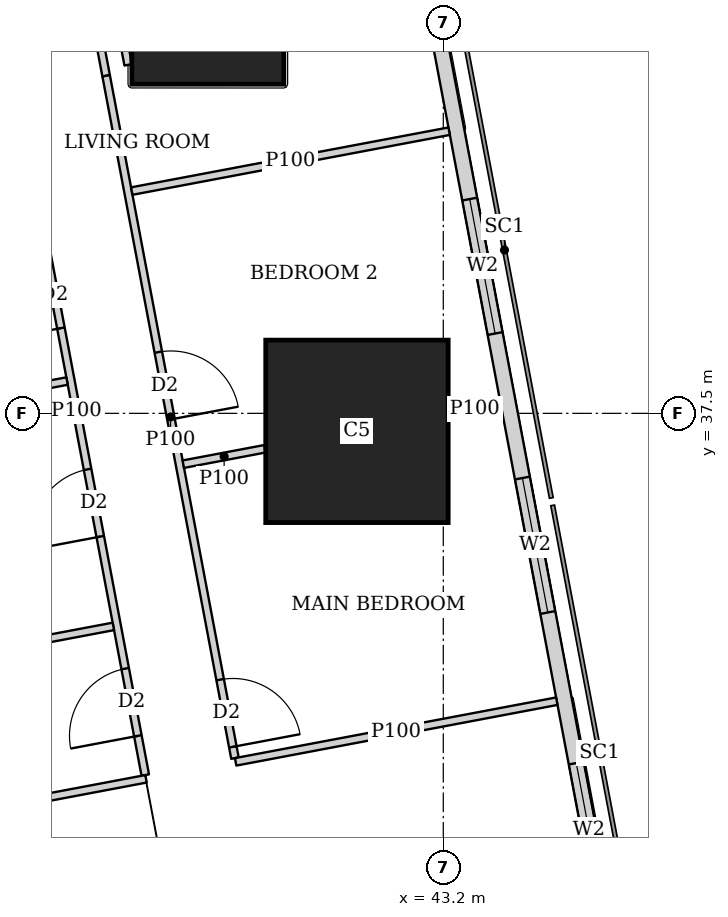
"""IFC4 building model, lengths in metres.
Left out: names, types, materials, properties, quantities, classifications, styles, units other than length and angle.
Written with IfcOpenShell. Run it as: python <this file> out.ifc"""

import sys

from ifc_helpers import new_model, si_unit, direction, frame, frame_2d, origin, origin_2d, place, context, subcontext, project, spatial, rectangle, extrude, element, fill, save


model = new_model("IFC4")
c1 = context("Model", 3, precision=1e-05, world=origin(), true_north=direction((0.0, 1.0)))
c2 = subcontext(c1, "Body", "Model", "MODEL_VIEW")
j1 = project(units=[si_unit("LENGTHUNIT", "METRE"), si_unit("PLANEANGLEUNIT", "RADIAN")], contexts=[c1])
p1 = place(None, origin())
s1 = spatial("IfcSite", under=j1, at=p1, CompositionType="ELEMENT")
p2 = place(p1, origin())
s2 = spatial("IfcBuilding", under=s1, at=p2, CompositionType="ELEMENT")
p3 = place(p2, frame((0.0, 0.0, 212.45)))
s3 = spatial("IfcBuildingStorey", under=s2, at=p3, CompositionType="ELEMENT", Elevation=212.45)
p4 = place(p3, frame((42.064, 37.263, 0.0), z_axis=(0.0, 0.0, 1.0), x_axis=(1.0, 0.0, 0.0)))
e1 = element("IfcColumn", 1, at=p4, inside=s3, PredefinedType="COLUMN", context=c2, shape_type="SweptSolid", body=[
    extrude(rectangle(XDim=2.4, YDim=2.4, at=origin_2d()), origin(), (0.0, 0.0, 1.0), 3.75),
])
p5 = place(p3, frame((40.102, 42.83, 0.0), z_axis=(0.0, 0.0, 1.0), x_axis=(1.0, 0.0, 0.0)))
e2 = element("IfcColumn", 2, at=p5, inside=s3, PredefinedType="COLUMN", context=c2, shape_type="SweptSolid", body=[
    extrude(rectangle(XDim=2.0, YDim=2.0, at=origin_2d()), origin(), (0.0, 0.0, 1.0), 3.75),
])
p6 = place(p3, frame((50.653, 2.703, 0.0), z_axis=(0.0, 0.0, 1.0), x_axis=(-0.185612026696, 0.982623109613, 0.0)))
e3 = element("IfcWall", 3, at=p6, inside=s3, PredefinedType="SOLIDWALL", context=c2, shape_type="SweptSolid", body=[
    extrude(rectangle(XDim=41.393, YDim=0.2, at=frame_2d((20.697, 0.0))), origin(), (0.0, 0.0, 1.0), 3.5),
])
p7 = place(p6, frame((1.633, 0.0, 0.9)))
e4 = element("IfcOpeningElement", 4, at=p7, cuts=e3, PredefinedType="OPENING", context=c2, shape_type="SweptSolid", body=[
    extrude(rectangle(XDim=1.8, YDim=1.5, at=frame_2d((0.9, 0.75))), frame((0.0, 0.11, 0.0), z_axis=(0.0, -1.0, 0.0), x_axis=(1.0, 0.0, 0.0)), (0.0, 0.0, 1.0), 0.22),
])
p8 = place(p6, frame((6.032, 0.0, 0.9)))
e5 = element("IfcOpeningElement", 5, at=p8, cuts=e3, PredefinedType="OPENING", context=c2, shape_type="SweptSolid", body=[
    extrude(rectangle(XDim=1.8, YDim=1.5, at=frame_2d((0.9, 0.75))), frame((0.0, 0.11, 0.0), z_axis=(0.0, -1.0, 0.0), x_axis=(1.0, 0.0, 0.0)), (0.0, 0.0, 1.0), 0.22),
])
p9 = place(p6, frame((9.848, 0.0, 0.9)))
e6 = element("IfcOpeningElement", 6, at=p9, cuts=e3, PredefinedType="OPENING", context=c2, shape_type="SweptSolid", body=[
    extrude(rectangle(XDim=1.8, YDim=1.5, at=frame_2d((0.9, 0.75))), frame((0.0, 0.11, 0.0), z_axis=(0.0, -1.0, 0.0), x_axis=(1.0, 0.0, 0.0)), (0.0, 0.0, 1.0), 0.22),
])
p10 = place(p6, frame((13.664, 0.0, 0.9)))
e7 = element("IfcOpeningElement", 7, at=p10, cuts=e3, PredefinedType="OPENING", context=c2, shape_type="SweptSolid", body=[
    extrude(rectangle(XDim=1.8, YDim=1.5, at=frame_2d((0.9, 0.75))), frame((0.0, 0.11, 0.0), z_axis=(0.0, -1.0, 0.0), x_axis=(1.0, 0.0, 0.0)), (0.0, 0.0, 1.0), 0.22),
])
p11 = place(p6, frame((17.481, 0.0, 0.9)))
e8 = element("IfcOpeningElement", 8, at=p11, cuts=e3, PredefinedType="OPENING", context=c2, shape_type="SweptSolid", body=[
    extrude(rectangle(XDim=1.8, YDim=1.5, at=frame_2d((0.9, 0.75))), frame((0.0, 0.11, 0.0), z_axis=(0.0, -1.0, 0.0), x_axis=(1.0, 0.0, 0.0)), (0.0, 0.0, 1.0), 0.22),
])
p12 = place(p6, frame((21.297, 0.0, 0.9)))
e9 = element("IfcOpeningElement", 9, at=p12, cuts=e3, PredefinedType="OPENING", context=c2, shape_type="SweptSolid", body=[
    extrude(rectangle(XDim=1.8, YDim=1.5, at=frame_2d((0.9, 0.75))), frame((0.0, 0.11, 0.0), z_axis=(0.0, -1.0, 0.0), x_axis=(1.0, 0.0, 0.0)), (0.0, 0.0, 1.0), 0.22),
])
p13 = place(p6, frame((25.113, 0.0, 0.9)))
e10 = element("IfcOpeningElement", 10, at=p13, cuts=e3, PredefinedType="OPENING", context=c2, shape_type="SweptSolid", body=[
    extrude(rectangle(XDim=1.8, YDim=1.5, at=frame_2d((0.9, 0.75))), frame((0.0, 0.11, 0.0), z_axis=(0.0, -1.0, 0.0), x_axis=(1.0, 0.0, 0.0)), (0.0, 0.0, 1.0), 0.22),
])
p14 = place(p6, frame((28.93, 0.0, 0.9)))
e11 = element("IfcOpeningElement", 11, at=p14, cuts=e3, PredefinedType="OPENING", context=c2, shape_type="SweptSolid", body=[
    extrude(rectangle(XDim=1.8, YDim=1.5, at=frame_2d((0.9, 0.75))), frame((0.0, 0.11, 0.0), z_axis=(0.0, -1.0, 0.0), x_axis=(1.0, 0.0, 0.0)), (0.0, 0.0, 1.0), 0.22),
])
p15 = place(p6, frame((32.746, 0.0, 0.9)))
e12 = element("IfcOpeningElement", 12, at=p15, cuts=e3, PredefinedType="OPENING", context=c2, shape_type="SweptSolid", body=[
    extrude(rectangle(XDim=1.8, YDim=1.5, at=frame_2d((0.9, 0.75))), frame((0.0, 0.11, 0.0), z_axis=(0.0, -1.0, 0.0), x_axis=(1.0, 0.0, 0.0)), (0.0, 0.0, 1.0), 0.22),
])
p16 = place(p6, frame((36.481, 0.0, 0.9)))
e13 = element("IfcOpeningElement", 13, at=p16, cuts=e3, PredefinedType="OPENING", context=c2, shape_type="SweptSolid", body=[
    extrude(rectangle(XDim=1.8, YDim=1.5, at=frame_2d((0.9, 0.75))), frame((0.0, 0.11, 0.0), z_axis=(0.0, -1.0, 0.0), x_axis=(1.0, 0.0, 0.0)), (0.0, 0.0, 1.0), 0.22),
])
p17 = place(p3, frame((33.68, 42.723, 0.0), z_axis=(0.0, 0.0, 1.0), x_axis=(0.185601160014, -0.982625162207, 0.0)))
e14 = element("IfcWall", 14, at=p17, inside=s3, PredefinedType="SOLIDWALL", context=c2, shape_type="SweptSolid", body=[
    extrude(rectangle(XDim=41.051, YDim=0.15, at=frame_2d((20.526, 0.0))), origin(), (0.0, 0.0, 1.0), 2.5),
])
p18 = place(p17, frame((12.307, 0.0, 0.0)))
e15 = element("IfcOpeningElement", 15, at=p18, cuts=e14, PredefinedType="OPENING", context=c2, shape_type="SweptSolid", body=[
    extrude(rectangle(XDim=1.0, YDim=2.1, at=frame_2d((0.5, 1.05))), frame((0.0, 0.085, 0.0), z_axis=(0.0, -1.0, 0.0), x_axis=(1.0, 0.0, 0.0)), (0.0, 0.0, 1.0), 0.17),
])
p19 = place(p17, frame((16.123, 0.0, 0.0)))
e16 = element("IfcOpeningElement", 16, at=p19, cuts=e14, PredefinedType="OPENING", context=c2, shape_type="SweptSolid", body=[
    extrude(rectangle(XDim=1.0, YDim=2.1, at=frame_2d((0.5, 1.05))), frame((0.0, 0.085, 0.0), z_axis=(0.0, -1.0, 0.0), x_axis=(1.0, 0.0, 0.0)), (0.0, 0.0, 1.0), 0.17),
])
p20 = place(p17, frame((30.902, 0.0, 0.0)))
e17 = element("IfcOpeningElement", 17, at=p20, cuts=e14, PredefinedType="OPENING", context=c2, shape_type="SweptSolid", body=[
    extrude(rectangle(XDim=1.0, YDim=2.1, at=frame_2d((0.5, 1.05))), frame((0.0, 0.085, 0.0), z_axis=(0.0, -1.0, 0.0), x_axis=(1.0, 0.0, 0.0)), (0.0, 0.0, 1.0), 0.17),
])
p21 = place(p3, frame((39.054, 42.085, 0.0), z_axis=(0.0, 0.0, 1.0), x_axis=(-0.185791584218, 0.982589175207, 0.0)))
e18 = element("IfcWall", 18, at=p21, inside=s3, PredefinedType="PARTITIONING", context=c2, shape_type="SweptSolid", body=[
    extrude(rectangle(XDim=3.628, YDim=0.1, at=frame_2d((1.814, 0.0))), origin(), (0.0, 0.0, 1.0), 2.05),
])
p22 = place(p3, frame((38.256, 44.628, 0.0), z_axis=(0.0, 0.0, 1.0), x_axis=(0.185700639943, -0.982606366927, 0.0)))
e19 = element("IfcWall", 19, at=p22, inside=s3, PredefinedType="PARTITIONING", context=c2, shape_type="SweptSolid", body=[
    extrude(rectangle(XDim=2.735, YDim=0.1, at=frame_2d((1.367, 0.0))), origin(), (0.0, 0.0, 1.0), 2.05),
])
p23 = place(p3, frame((38.764, 41.941, 0.0), z_axis=(0.0, 0.0, 1.0), x_axis=(0.185548572312, -0.982635093671, 0.0)))
e20 = element("IfcWall", 20, at=p23, inside=s3, PredefinedType="PARTITIONING", context=c2, shape_type="SweptSolid", body=[
    extrude(rectangle(XDim=9.135, YDim=0.1, at=frame_2d((4.568, 0.0))), origin(), (0.0, 0.0, 1.0), 3.5),
])
p24 = place(p23, frame((8.085, 0.0, 0.0)))
e21 = element("IfcOpeningElement", 21, at=p24, cuts=e20, PredefinedType="OPENING", context=c2, shape_type="SweptSolid", body=[
    extrude(rectangle(XDim=0.9, YDim=2.1, at=frame_2d((0.45, 1.05))), frame((0.0, 0.06, 0.0), z_axis=(0.0, -1.0, 0.0), x_axis=(1.0, 0.0, 0.0)), (0.0, 0.0, 1.0), 0.12),
])
p25 = place(p23, frame((3.7, 0.0, 0.0)))
e22 = element("IfcOpeningElement", 22, at=p25, cuts=e20, PredefinedType="OPENING", context=c2, shape_type="SweptSolid", body=[
    extrude(rectangle(XDim=0.9, YDim=2.1, at=frame_2d((0.45, 1.05))), frame((0.0, 0.06, 0.0), z_axis=(0.0, -1.0, 0.0), x_axis=(1.0, 0.0, 0.0)), (0.0, 0.0, 1.0), 0.12),
])
p26 = place(p3, frame((37.473, 42.309, 0.0), z_axis=(0.0, 0.0, 1.0), x_axis=(0.185491912953, -0.982645790827, 0.0)))
e23 = element("IfcWall", 23, at=p26, inside=s3, PredefinedType="PARTITIONING", context=c2, shape_type="SweptSolid", body=[
    extrude(rectangle(XDim=9.737, YDim=0.1, at=frame_2d((4.869, 0.0))), origin(), (0.0, 0.0, 1.0), 3.5),
])
p27 = place(p26, frame((8.312, 0.0, 0.0)))
e24 = element("IfcOpeningElement", 24, at=p27, cuts=e23, PredefinedType="OPENING", context=c2, shape_type="SweptSolid", body=[
    extrude(rectangle(XDim=0.9, YDim=2.1, at=frame_2d((0.45, 1.05))), frame((0.0, 0.06, 0.0), z_axis=(0.0, -1.0, 0.0), x_axis=(1.0, 0.0, 0.0)), (0.0, 0.0, 1.0), 0.12),
])
p28 = place(p26, frame((2.853, 0.0, 0.0)))
e25 = element("IfcOpeningElement", 25, at=p28, cuts=e23, PredefinedType="OPENING", context=c2, shape_type="SweptSolid", body=[
    extrude(rectangle(XDim=0.9, YDim=2.1, at=frame_2d((0.45, 1.05))), frame((0.0, 0.06, 0.0), z_axis=(0.0, -1.0, 0.0), x_axis=(1.0, 0.0, 0.0)), (0.0, 0.0, 1.0), 0.12),
])
p29 = place(p26, frame((5.644, 0.0, 0.0)))
e26 = element("IfcOpeningElement", 26, at=p29, cuts=e23, PredefinedType="OPENING", context=c2, shape_type="SweptSolid", body=[
    extrude(rectangle(XDim=0.9, YDim=2.1, at=frame_2d((0.45, 1.05))), frame((0.0, 0.06, 0.0), z_axis=(0.0, -1.0, 0.0), x_axis=(1.0, 0.0, 0.0)), (0.0, 0.0, 1.0), 0.12),
])
p30 = place(p3, frame((43.277, 41.212, 0.0), z_axis=(0.0, 0.0, 1.0), x_axis=(-0.982665405803, -0.185387972203, 0.0)))
e27 = element("IfcWall", 27, at=p30, inside=s3, PredefinedType="PARTITIONING", context=c2, shape_type="SweptSolid", body=[
    extrude(rectangle(XDim=4.25, YDim=0.1, at=frame_2d((2.125, 0.0))), origin(), (0.0, 0.0, 1.0), 2.05),
])
p31 = place(p3, frame((43.955, 37.62, 0.0), z_axis=(0.0, 0.0, 1.0), x_axis=(-0.982495415327, -0.186286765128, 0.0)))
e28 = element("IfcWall", 28, at=p31, inside=s3, PredefinedType="PARTITIONING", context=c2, shape_type="SweptSolid", body=[
    extrude(rectangle(XDim=0.693, YDim=0.1, at=frame_2d((0.347, 0.0))), origin(), (0.0, 0.0, 1.0), 3.5),
])
p32 = place(p3, frame((40.854, 37.034, 0.0), z_axis=(0.0, 0.0, 1.0), x_axis=(-0.982651678759, -0.185460718839, 0.0)))
e29 = element("IfcWall", 29, at=p32, inside=s3, PredefinedType="PARTITIONING", context=c2, shape_type="SweptSolid", body=[
    extrude(rectangle(XDim=1.094, YDim=0.1, at=frame_2d((0.547, 0.0))), origin(), (0.0, 0.0, 1.0), 3.5),
])
p33 = place(p3, frame((44.693, 33.713, 0.0), z_axis=(0.0, 0.0, 1.0), x_axis=(-0.982633535512, -0.185556823879, 0.0)))
e30 = element("IfcWall", 30, at=p33, inside=s3, PredefinedType="PARTITIONING", context=c2, shape_type="SweptSolid", body=[
    extrude(rectangle(XDim=4.3, YDim=0.1, at=frame_2d((2.15, 0.0))), origin(), (0.0, 0.0, 1.0), 2.05),
])
p34 = place(p3, frame((38.25, 37.925, 0.0), z_axis=(0.0, 0.0, 1.0), x_axis=(-0.982610209589, -0.185680305934, 0.0)))
e31 = element("IfcWall", 31, at=p34, inside=s3, PredefinedType="PARTITIONING", context=c2, shape_type="SweptSolid", body=[
    extrude(rectangle(XDim=1.567, YDim=0.1, at=frame_2d((0.784, 0.0))), origin(), (0.0, 0.0, 1.0), 3.5),
])
p35 = place(p3, frame((39.289, 32.692, 0.0), z_axis=(0.0, 0.0, 1.0), x_axis=(-0.982662827464, -0.185401638399, 0.0)))
e32 = element("IfcWall", 32, at=p35, inside=s3, PredefinedType="PARTITIONING", context=c2, shape_type="SweptSolid", body=[
    extrude(rectangle(XDim=3.575, YDim=0.1, at=frame_2d((1.788, 0.0))), origin(), (0.0, 0.0, 1.0), 3.5),
])
p36 = place(p3, frame((38.859, 34.697, 0.0), z_axis=(0.0, 0.0, 1.0), x_axis=(-0.982626628545, -0.185593396635, 0.0)))
e33 = element("IfcWall", 33, at=p36, inside=s3, PredefinedType="PARTITIONING", context=c2, shape_type="SweptSolid", body=[
    extrude(rectangle(XDim=3.524, YDim=0.1, at=frame_2d((1.762, 0.0))), origin(), (0.0, 0.0, 1.0), 3.5),
])
p37 = place(p14, origin())
e34 = element("IfcWindow", 34, at=p37, inside=s3, PartitioningType="SINGLE_PANEL", PredefinedType="WINDOW", context=c2, shape_type="SweptSolid", body=[
    extrude(rectangle(XDim=1.8, YDim=1.5, at=frame_2d((0.9, 0.75))), frame((0.0, 0.03, 0.0), z_axis=(0.0, -1.0, 0.0), x_axis=(1.0, 0.0, 0.0)), (0.0, 0.0, 1.0), 0.06),
])
fill(e11, e34)
p38 = place(p15, origin())
e35 = element("IfcWindow", 35, at=p38, inside=s3, PartitioningType="SINGLE_PANEL", PredefinedType="WINDOW", context=c2, shape_type="SweptSolid", body=[
    extrude(rectangle(XDim=1.8, YDim=1.5, at=frame_2d((0.9, 0.75))), frame((0.0, 0.03, 0.0), z_axis=(0.0, -1.0, 0.0), x_axis=(1.0, 0.0, 0.0)), (0.0, 0.0, 1.0), 0.06),
])
fill(e12, e35)
p39 = place(p16, origin())
e36 = element("IfcWindow", 36, at=p39, inside=s3, PartitioningType="SINGLE_PANEL", PredefinedType="WINDOW", context=c2, shape_type="SweptSolid", body=[
    extrude(rectangle(XDim=1.8, YDim=1.5, at=frame_2d((0.9, 0.75))), frame((0.0, 0.03, 0.0), z_axis=(0.0, -1.0, 0.0), x_axis=(1.0, 0.0, 0.0)), (0.0, 0.0, 1.0), 0.06),
])
fill(e13, e36)
p40 = place(p24, origin())
e37 = element("IfcDoor", 37, at=p40, inside=s3, OperationType="SINGLE_SWING_RIGHT", PredefinedType="DOOR", context=c2, shape_type="SweptSolid", body=[
    extrude(rectangle(XDim=0.9, YDim=2.1, at=frame_2d((0.45, 1.05))), frame((0.0, 0.025, 0.0), z_axis=(0.0, -1.0, 0.0), x_axis=(1.0, 0.0, 0.0)), (0.0, 0.0, 1.0), 0.05),
])
fill(e21, e37)
p41 = place(p25, origin())
e38 = element("IfcDoor", 38, at=p41, inside=s3, OperationType="SINGLE_SWING_RIGHT", PredefinedType="DOOR", context=c2, shape_type="SweptSolid", body=[
    extrude(rectangle(XDim=0.9, YDim=2.1, at=frame_2d((0.45, 1.05))), frame((0.0, 0.025, 0.0), z_axis=(0.0, -1.0, 0.0), x_axis=(1.0, 0.0, 0.0)), (0.0, 0.0, 1.0), 0.05),
])
fill(e22, e38)
p42 = place(p27, origin())
e39 = element("IfcDoor", 39, at=p42, inside=s3, OperationType="SINGLE_SWING_LEFT", PredefinedType="DOOR", context=c2, shape_type="SweptSolid", body=[
    extrude(rectangle(XDim=0.9, YDim=2.1, at=frame_2d((0.45, 1.05))), frame((0.0, 0.025, 0.0), z_axis=(0.0, -1.0, 0.0), x_axis=(1.0, 0.0, 0.0)), (0.0, 0.0, 1.0), 0.05),
])
fill(e24, e39)
p43 = place(p28, origin())
e40 = element("IfcDoor", 40, at=p43, inside=s3, OperationType="SINGLE_SWING_LEFT", PredefinedType="DOOR", context=c2, shape_type="SweptSolid", body=[
    extrude(rectangle(XDim=0.9, YDim=2.1, at=frame_2d((0.45, 1.05))), frame((0.0, 0.025, 0.0), z_axis=(0.0, -1.0, 0.0), x_axis=(1.0, 0.0, 0.0)), (0.0, 0.0, 1.0), 0.05),
])
fill(e25, e40)
p44 = place(p29, origin())
e41 = element("IfcDoor", 41, at=p44, inside=s3, OperationType="SINGLE_SWING_LEFT", PredefinedType="DOOR", context=c2, shape_type="SweptSolid", body=[
    extrude(rectangle(XDim=0.9, YDim=2.1, at=frame_2d((0.45, 1.05))), frame((0.0, 0.025, 0.0), z_axis=(0.0, -1.0, 0.0), x_axis=(1.0, 0.0, 0.0)), (0.0, 0.0, 1.0), 0.05),
])
fill(e26, e41)
save(model, sys.argv[1])
